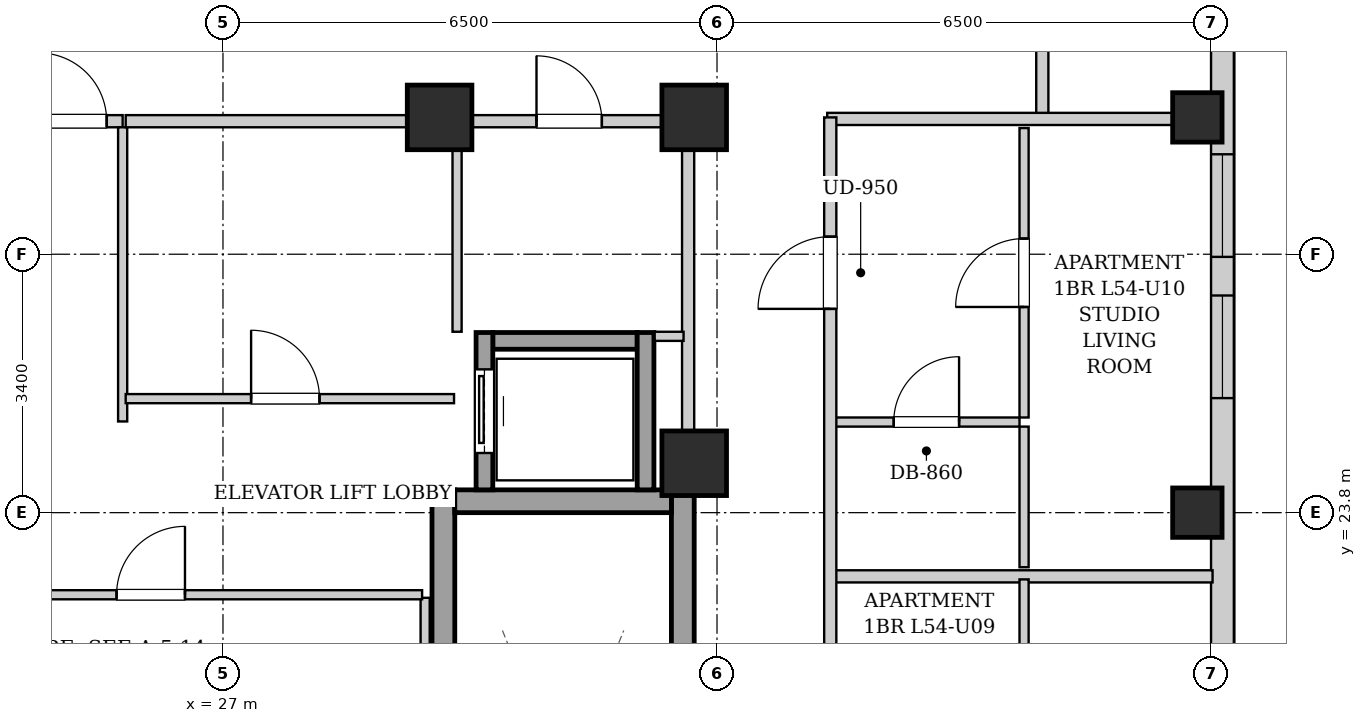
"""IFC4 building model, lengths in metres.
Left out: names, types, materials, properties, quantities, classifications, styles, units other than length and angle.
Written with IfcOpenShell. Run it as: python <this file> out.ifc"""

import sys

from ifc_helpers import new_model, si_unit, direction, frame, frame_2d, origin, origin_2d, place, context, subcontext, project, spatial, rectangle, extrude, element, fill, save


model = new_model("IFC4")
c1 = context("Model", 3, precision=1e-05, world=origin(), true_north=direction((0.0, 1.0)))
c2 = subcontext(c1, "Body", "Model", "MODEL_VIEW")
j1 = project(units=[si_unit("LENGTHUNIT", "METRE"), si_unit("PLANEANGLEUNIT", "RADIAN")], contexts=[c1])
p1 = place(None, origin())
s1 = spatial("IfcSite", under=j1, at=p1, CompositionType="ELEMENT")
p2 = place(p1, origin())
s2 = spatial("IfcBuilding", under=s1, at=p2, CompositionType="ELEMENT")
p3 = place(p2, frame((0.0, 0.0, 187.6)))
s3 = spatial("IfcBuildingStorey", under=s2, at=p3, CompositionType="ELEMENT", Elevation=187.6)
for number, where, z_axis, x_axis in (
    (1, (39.82, 23.8, 0.0), (0.0, 0.0, 1.0), (1.0, 0.0, 0.0)),
    (2, (39.82, 29.0, 0.0), (0.0, 0.0, 1.0), (1.0, 0.0, 0.0)),
):
    element("IfcColumn", number, at=place(p3, frame(where, z_axis=z_axis, x_axis=x_axis)), inside=s3, PredefinedType="COLUMN", context=c2, shape_type="SweptSolid", body=[
        extrude(rectangle(XDim=0.65, YDim=0.65, at=origin_2d()), origin(), (0.0, 0.0, 1.0), 3.3),
    ])
for number, where, z_axis, x_axis in (
    (3, (29.85, 29.0, 0.0), (0.0, 0.0, 1.0), (1.0, 0.0, 0.0)),
    (4, (33.2, 29.0, 0.0), (0.0, 0.0, 1.0), (1.0, 0.0, 0.0)),
    (5, (33.2, 24.45, 0.0), (0.0, 0.0, 1.0), (1.0, 0.0, 0.0)),
):
    element("IfcColumn", number, at=place(p3, frame(where, z_axis=z_axis, x_axis=x_axis)), inside=s3, PredefinedType="COLUMN", context=c2, shape_type="SweptSolid", body=[
        extrude(rectangle(XDim=0.85, YDim=0.85, at=origin_2d()), origin(), (0.0, 0.0, 1.0), 3.3),
    ])
p4 = place(p3, frame((40.15, 37.7, 0.0), z_axis=(0.0, 0.0, 1.0), x_axis=(0.0, -1.0, 0.0)))
e6 = element("IfcWall", 6, at=p4, inside=s3, PredefinedType="SOLIDWALL", context=c2, shape_type="SweptSolid", body=[
    extrude(rectangle(XDim=31.4, YDim=0.3, at=frame_2d((15.7, 0.0))), origin(), (0.0, 0.0, 1.0), 3.04),
])
p5 = place(p4, frame((1.504, 0.0, 0.55)))
e7 = element("IfcOpeningElement", 7, at=p5, cuts=e6, PredefinedType="OPENING", context=c2, shape_type="SweptSolid", body=[
    extrude(rectangle(XDim=1.35, YDim=1.2, at=frame_2d((0.675, 0.6))), frame((0.0, 0.16, 0.0), z_axis=(0.0, -1.0, 0.0), x_axis=(1.0, 0.0, 0.0)), (0.0, 0.0, 1.0), 0.32),
])
p6 = place(p4, frame((18.2, 0.0, 0.55)))
e8 = element("IfcOpeningElement", 8, at=p6, cuts=e6, PredefinedType="OPENING", context=c2, shape_type="SweptSolid", body=[
    extrude(rectangle(XDim=1.35, YDim=1.2, at=frame_2d((0.675, 0.6))), frame((0.0, 0.16, 0.0), z_axis=(0.0, -1.0, 0.0), x_axis=(1.0, 0.0, 0.0)), (0.0, 0.0, 1.0), 0.32),
])
p7 = place(p4, frame((19.81, 0.0, 0.55)))
e9 = element("IfcOpeningElement", 9, at=p7, cuts=e6, PredefinedType="OPENING", context=c2, shape_type="SweptSolid", body=[
    extrude(rectangle(XDim=1.35, YDim=1.2, at=frame_2d((0.675, 0.6))), frame((0.0, 0.16, 0.0), z_axis=(0.0, -1.0, 0.0), x_axis=(1.0, 0.0, 0.0)), (0.0, 0.0, 1.0), 0.32),
])
p8 = place(p4, frame((11.043, 0.0, 0.55)))
e10 = element("IfcOpeningElement", 10, at=p8, cuts=e6, PredefinedType="OPENING", context=c2, shape_type="SweptSolid", body=[
    extrude(rectangle(XDim=1.35, YDim=1.2, at=frame_2d((0.675, 0.6))), frame((0.0, 0.16, 0.0), z_axis=(0.0, -1.0, 0.0), x_axis=(1.0, 0.0, 0.0)), (0.0, 0.0, 1.0), 0.32),
])
p9 = place(p4, frame((9.185, 0.0, 0.55)))
e11 = element("IfcOpeningElement", 11, at=p9, cuts=e6, PredefinedType="OPENING", context=c2, shape_type="SweptSolid", body=[
    extrude(rectangle(XDim=1.35, YDim=1.2, at=frame_2d((0.675, 0.6))), frame((0.0, 0.16, 0.0), z_axis=(0.0, -1.0, 0.0), x_axis=(1.0, 0.0, 0.0)), (0.0, 0.0, 1.0), 0.32),
])
for number, where, z_axis, x_axis in (
    (12, (29.9, 15.1, 0.0), (0.0, 0.0, 1.0), (0.0, 1.0, 0.0)),
    (13, (33.05, 15.1, 0.0), (0.0, 0.0, 1.0), (0.0, 1.0, 0.0)),
):
    element("IfcWall", number, at=place(p3, frame(where, z_axis=z_axis, x_axis=x_axis)), inside=s3, PredefinedType="SHEAR", context=c2, shape_type="SweptSolid", body=[
        extrude(rectangle(XDim=9.0, YDim=0.3, at=frame_2d((4.5, 0.0))), origin(), (0.0, 0.0, 1.0), 3.04),
    ])
p10 = place(p3, frame((30.05, 23.95, 0.0), z_axis=(0.0, 0.0, 1.0), x_axis=(1.0, 0.0, 0.0)))
e14 = element("IfcWall", 14, at=p10, inside=s3, PredefinedType="SHEAR", context=c2, shape_type="SweptSolid", body=[
    extrude(rectangle(XDim=2.85, YDim=0.3, at=frame_2d((1.425, 0.0))), origin(), (0.0, 0.0, 1.0), 3.04),
])
p11 = place(p3, frame((30.55, 26.06, 0.0), z_axis=(0.0, 0.0, 1.0), x_axis=(1.0, 0.0, 0.0)))
e15 = element("IfcWall", 15, at=p11, inside=s3, PredefinedType="SHEAR", context=c2, shape_type="SweptSolid", body=[
    extrude(rectangle(XDim=1.9, YDim=0.22, at=frame_2d((0.95, 0.0))), origin(), (0.0, 0.0, 1.0), 3.04),
])
p12 = place(p3, frame((30.44, 24.1, 0.0), z_axis=(0.0, 0.0, 1.0), x_axis=(0.0, 1.0, 0.0)))
e16 = element("IfcWall", 16, at=p12, inside=s3, PredefinedType="SHEAR", context=c2, shape_type="SweptSolid", body=[
    extrude(rectangle(XDim=2.07, YDim=0.22, at=frame_2d((1.035, 0.0))), origin(), (0.0, 0.0, 1.0), 3.04),
])
p13 = place(p12, frame((0.485, 0.0, 0.0)))
e17 = element("IfcOpeningElement", 17, at=p13, cuts=e16, PredefinedType="OPENING", context=c2, shape_type="SweptSolid", body=[
    extrude(rectangle(XDim=1.1, YDim=2.15, at=frame_2d((0.55, 1.075))), frame((0.0, 0.12, 0.0), z_axis=(0.0, -1.0, 0.0), x_axis=(1.0, 0.0, 0.0)), (0.0, 0.0, 1.0), 0.24),
])
p14 = place(p3, frame((32.56, 24.1, 0.0), z_axis=(0.0, 0.0, 1.0), x_axis=(0.0, 1.0, 0.0)))
e18 = element("IfcWall", 18, at=p14, inside=s3, PredefinedType="SHEAR", context=c2, shape_type="SweptSolid", body=[
    extrude(rectangle(XDim=2.07, YDim=0.22, at=frame_2d((1.035, 0.0))), origin(), (0.0, 0.0, 1.0), 3.04),
])
p15 = place(p3, frame((33.12, 24.12, 0.0), z_axis=(0.0, 0.0, 1.0), x_axis=(0.0, 1.0, 0.0)))
e19 = element("IfcWall", 19, at=p15, inside=s3, PredefinedType="PARTITIONING", context=c2, shape_type="SweptSolid", body=[
    extrude(rectangle(XDim=4.76, YDim=0.16, at=frame_2d((2.38, 0.0))), origin(), (0.0, 0.0, 1.0), 2.375),
])
p16 = place(p3, frame((24.36, 28.95, 0.0), z_axis=(0.0, 0.0, 1.0), x_axis=(1.0, 0.0, 0.0)))
e20 = element("IfcWall", 20, at=p16, inside=s3, PredefinedType="PARTITIONING", context=c2, shape_type="SweptSolid", body=[
    extrude(rectangle(XDim=1.32, YDim=0.16, at=frame_2d((0.66, 0.0))), origin(), (0.0, 0.0, 1.0), 2.556),
])
p17 = place(p16, frame((0.21, 0.0, 0.0)))
e21 = element("IfcOpeningElement", 21, at=p17, cuts=e20, PredefinedType="OPENING", context=c2, shape_type="SweptSolid", body=[
    extrude(rectangle(XDim=0.9, YDim=2.05, at=frame_2d((0.45, 1.025))), frame((0.0, 0.09, 0.0), z_axis=(0.0, -1.0, 0.0), x_axis=(1.0, 0.0, 0.0)), (0.0, 0.0, 1.0), 0.18),
])
p18 = place(p3, frame((25.68, 25.0, 0.0), z_axis=(0.0, 0.0, 1.0), x_axis=(0.0, 1.0, 0.0)))
e22 = element("IfcWall", 22, at=p18, inside=s3, PredefinedType="PARTITIONING", context=c2, shape_type="SweptSolid", body=[
    extrude(rectangle(XDim=3.87, YDim=0.12, at=frame_2d((1.935, 0.0))), origin(), (0.0, 0.0, 1.0), 3.04),
])
p19 = place(p3, frame((30.08, 26.18, 0.0), z_axis=(0.0, 0.0, 1.0), x_axis=(0.0, 1.0, 0.0)))
e23 = element("IfcWall", 23, at=p19, inside=s3, PredefinedType="PARTITIONING", context=c2, shape_type="SweptSolid", body=[
    extrude(rectangle(XDim=2.68, YDim=0.12, at=frame_2d((1.34, 0.0))), origin(), (0.0, 0.0, 1.0), 3.04),
])
p20 = place(p3, frame((32.68, 26.12, 0.0), z_axis=(0.0, 0.0, 1.0), x_axis=(1.0, 0.0, 0.0)))
e24 = element("IfcWall", 24, at=p20, inside=s3, PredefinedType="PARTITIONING", context=c2, shape_type="SweptSolid", body=[
    extrude(rectangle(XDim=0.38, YDim=0.12, at=frame_2d((0.19, 0.0))), origin(), (0.0, 0.0, 1.0), 3.04),
])
p21 = place(p3, frame((30.08, 28.95, 0.0), z_axis=(0.0, 0.0, 1.0), x_axis=(1.0, 0.0, 0.0)))
e25 = element("IfcWall", 25, at=p21, inside=s3, PredefinedType="PARTITIONING", context=c2, shape_type="SweptSolid", body=[
    extrude(rectangle(XDim=2.96, YDim=0.16, at=frame_2d((1.48, 0.0))), origin(), (0.0, 0.0, 1.0), 3.04),
])
p22 = place(p21, frame((1.045, 0.0, 0.0)))
e26 = element("IfcOpeningElement", 26, at=p22, cuts=e25, PredefinedType="OPENING", context=c2, shape_type="SweptSolid", body=[
    extrude(rectangle(XDim=0.86, YDim=2.05, at=frame_2d((0.43, 1.025))), frame((0.0, 0.09, 0.0), z_axis=(0.0, -1.0, 0.0), x_axis=(1.0, 0.0, 0.0)), (0.0, 0.0, 1.0), 0.18),
])
p23 = place(p3, frame((25.72, 28.95, 0.0), z_axis=(0.0, 0.0, 1.0), x_axis=(1.0, 0.0, 0.0)))
e27 = element("IfcWall", 27, at=p23, inside=s3, PredefinedType="PARTITIONING", context=c2, shape_type="SweptSolid", body=[
    extrude(rectangle(XDim=4.32, YDim=0.16, at=frame_2d((2.16, 0.0))), origin(), (0.0, 0.0, 1.0), 2.556),
])
p24 = place(p3, frame((25.72, 25.3, 0.0), z_axis=(0.0, 0.0, 1.0), x_axis=(1.0, 0.0, 0.0)))
e28 = element("IfcWall", 28, at=p24, inside=s3, PredefinedType="PARTITIONING", context=c2, shape_type="SweptSolid", body=[
    extrude(rectangle(XDim=4.32, YDim=0.12, at=frame_2d((2.16, 0.0))), origin(), (0.0, 0.0, 1.0), 3.04),
])
p25 = place(p24, frame((1.65, 0.0, 0.0)))
e29 = element("IfcOpeningElement", 29, at=p25, cuts=e28, PredefinedType="OPENING", context=c2, shape_type="SweptSolid", body=[
    extrude(rectangle(XDim=0.9, YDim=2.05, at=frame_2d((0.45, 1.025))), frame((0.0, 0.07, 0.0), z_axis=(0.0, -1.0, 0.0), x_axis=(1.0, 0.0, 0.0)), (0.0, 0.0, 1.0), 0.14),
])
p26 = place(p3, frame((29.66, 20.62, 0.0), z_axis=(0.0, 0.0, 1.0), x_axis=(0.0, 1.0, 0.0)))
e30 = element("IfcWall", 30, at=p26, inside=s3, PredefinedType="PARTITIONING", context=c2, shape_type="SweptSolid", body=[
    extrude(rectangle(XDim=2.06, YDim=0.12, at=frame_2d((1.03, 0.0))), origin(), (0.0, 0.0, 1.0), 3.04),
])
p27 = place(p3, frame((22.35, 22.72, 0.0), z_axis=(0.0, 0.0, 1.0), x_axis=(1.0, 0.0, 0.0)))
e31 = element("IfcWall", 31, at=p27, inside=s3, PredefinedType="PARTITIONING", context=c2, shape_type="SweptSolid", body=[
    extrude(rectangle(XDim=7.27, YDim=0.12, at=frame_2d((3.635, 0.0))), origin(), (0.0, 0.0, 1.0), 3.04),
])
p28 = place(p27, frame((3.25, 0.0, 0.0)))
e32 = element("IfcOpeningElement", 32, at=p28, cuts=e31, PredefinedType="OPENING", context=c2, shape_type="SweptSolid", body=[
    extrude(rectangle(XDim=0.9, YDim=2.05, at=frame_2d((0.45, 1.025))), frame((0.0, 0.07, 0.0), z_axis=(0.0, -1.0, 0.0), x_axis=(1.0, 0.0, 0.0)), (0.0, 0.0, 1.0), 0.14),
])
p29 = place(p3, frame((37.78, 28.98, 0.0), z_axis=(0.0, 0.0, 1.0), x_axis=(0.0, 1.0, 0.0)))
e33 = element("IfcWall", 33, at=p29, inside=s3, PredefinedType="PARTITIONING", context=c2, shape_type="SweptSolid", body=[
    extrude(rectangle(XDim=1.58, YDim=0.16, at=frame_2d((0.79, 0.0))), origin(), (0.0, 0.0, 1.0), 3.04),
])
p30 = place(p3, frame((34.95, 28.98, 0.0), z_axis=(0.0, 0.0, 1.0), x_axis=(1.0, 0.0, 0.0)))
e34 = element("IfcWall", 34, at=p30, inside=s3, PredefinedType="PARTITIONING", context=c2, shape_type="SweptSolid", body=[
    extrude(rectangle(XDim=5.07, YDim=0.16, at=frame_2d((2.535, 0.0))), origin(), (0.0, 0.0, 1.0), 2.556),
])
p31 = place(p3, frame((35.03, 22.962, 0.0), z_axis=(0.0, 0.0, 1.0), x_axis=(1.0, 0.0, 0.0)))
e35 = element("IfcWall", 35, at=p31, inside=s3, PredefinedType="PARTITIONING", context=c2, shape_type="SweptSolid", body=[
    extrude(rectangle(XDim=4.99, YDim=0.16, at=frame_2d((2.495, 0.0))), origin(), (0.0, 0.0, 1.0), 3.04),
])
p32 = place(p3, frame((37.54, 17.489, 0.0), z_axis=(0.0, 0.0, 1.0), x_axis=(0.0, 1.0, 0.0)))
e36 = element("IfcWall", 36, at=p32, inside=s3, PredefinedType="PARTITIONING", context=c2, shape_type="SweptSolid", body=[
    extrude(rectangle(XDim=5.433, YDim=0.12, at=frame_2d((2.717, 0.0))), origin(), (0.0, 0.0, 1.0), 3.04),
])
p33 = place(p32, frame((2.266, 0.0, 0.0)))
e37 = element("IfcOpeningElement", 37, at=p33, cuts=e36, PredefinedType="OPENING", context=c2, shape_type="SweptSolid", body=[
    extrude(rectangle(XDim=0.9, YDim=2.05, at=frame_2d((0.45, 1.025))), frame((0.0, 0.07, 0.0), z_axis=(0.0, -1.0, 0.0), x_axis=(1.0, 0.0, 0.0)), (0.0, 0.0, 1.0), 0.14),
])
p34 = place(p3, frame((35.03, 24.992, 0.0), z_axis=(0.0, 0.0, 1.0), x_axis=(1.0, 0.0, 0.0)))
e38 = element("IfcWall", 38, at=p34, inside=s3, PredefinedType="PARTITIONING", context=c2, shape_type="SweptSolid", body=[
    extrude(rectangle(XDim=2.45, YDim=0.12, at=frame_2d((1.225, 0.0))), origin(), (0.0, 0.0, 1.0), 3.04),
])
p35 = place(p34, frame((0.795, 0.0, 0.0)))
e39 = element("IfcOpeningElement", 39, at=p35, cuts=e38, PredefinedType="OPENING", context=c2, shape_type="SweptSolid", body=[
    extrude(rectangle(XDim=0.86, YDim=2.05, at=frame_2d((0.43, 1.025))), frame((0.0, 0.07, 0.0), z_axis=(0.0, -1.0, 0.0), x_axis=(1.0, 0.0, 0.0)), (0.0, 0.0, 1.0), 0.14),
])
p36 = place(p3, frame((37.54, 23.082, 0.0), z_axis=(0.0, 0.0, 1.0), x_axis=(0.0, 1.0, 0.0)))
e40 = element("IfcWall", 40, at=p36, inside=s3, PredefinedType="PARTITIONING", context=c2, shape_type="SweptSolid", body=[
    extrude(rectangle(XDim=1.85, YDim=0.12, at=frame_2d((0.925, 0.0))), origin(), (0.0, 0.0, 1.0), 3.04),
])
p37 = place(p3, frame((37.54, 25.052, 0.0), z_axis=(0.0, 0.0, 1.0), x_axis=(0.0, 1.0, 0.0)))
e41 = element("IfcWall", 41, at=p37, inside=s3, PredefinedType="PARTITIONING", context=c2, shape_type="SweptSolid", body=[
    extrude(rectangle(XDim=3.808, YDim=0.12, at=frame_2d((1.904, 0.0))), origin(), (0.0, 0.0, 1.0), 3.04),
])
p38 = place(p37, frame((1.454, 0.0, 0.0)))
e42 = element("IfcOpeningElement", 42, at=p38, cuts=e41, PredefinedType="OPENING", context=c2, shape_type="SweptSolid", body=[
    extrude(rectangle(XDim=0.9, YDim=2.05, at=frame_2d((0.45, 1.025))), frame((0.0, 0.07, 0.0), z_axis=(0.0, -1.0, 0.0), x_axis=(1.0, 0.0, 0.0)), (0.0, 0.0, 1.0), 0.14),
])
p39 = place(p3, frame((34.99, 15.07, 0.0), z_axis=(0.0, 0.0, 1.0), x_axis=(0.0, 1.0, 0.0)))
e43 = element("IfcWall", 43, at=p39, inside=s3, PredefinedType="PARTITIONING", context=c2, shape_type="SweptSolid", body=[
    extrude(rectangle(XDim=13.93, YDim=0.16, at=frame_2d((6.965, 0.0))), origin(), (0.0, 0.0, 1.0), 3.04),
])
p40 = place(p39, frame((4.661, 0.0, 0.0)))
e44 = element("IfcOpeningElement", 44, at=p40, cuts=e43, PredefinedType="OPENING", context=c2, shape_type="SweptSolid", body=[
    extrude(rectangle(XDim=0.95, YDim=2.1, at=frame_2d((0.475, 1.05))), frame((0.0, 0.09, 0.0), z_axis=(0.0, -1.0, 0.0), x_axis=(1.0, 0.0, 0.0)), (0.0, 0.0, 1.0), 0.18),
])
p41 = place(p39, frame((11.411, 0.0, 0.0)))
e45 = element("IfcOpeningElement", 45, at=p41, cuts=e43, PredefinedType="OPENING", context=c2, shape_type="SweptSolid", body=[
    extrude(rectangle(XDim=0.95, YDim=2.1, at=frame_2d((0.475, 1.05))), frame((0.0, 0.09, 0.0), z_axis=(0.0, -1.0, 0.0), x_axis=(1.0, 0.0, 0.0)), (0.0, 0.0, 1.0), 0.18),
])
p42 = place(p13, origin())
e46 = element("IfcDoor", 46, at=p42, inside=s3, OperationType="SLIDING_TO_LEFT", PredefinedType="DOOR", context=c2, shape_type="SweptSolid", body=[
    extrude(rectangle(XDim=1.1, YDim=2.15, at=frame_2d((0.55, 1.075))), frame((0.0, 0.025, 0.0), z_axis=(0.0, -1.0, 0.0), x_axis=(1.0, 0.0, 0.0)), (0.0, 0.0, 1.0), 0.05),
])
fill(e17, e46)
p43 = place(p17, origin())
e47 = element("IfcDoor", 47, at=p43, inside=s3, OperationType="SINGLE_SWING_LEFT", PredefinedType="DOOR", context=c2, shape_type="SweptSolid", body=[
    extrude(rectangle(XDim=0.9, YDim=2.05, at=frame_2d((0.45, 1.025))), frame((0.0, 0.025, 0.0), z_axis=(0.0, -1.0, 0.0), x_axis=(1.0, 0.0, 0.0)), (0.0, 0.0, 1.0), 0.05),
])
fill(e21, e47)
p44 = place(p22, origin())
e48 = element("IfcDoor", 48, at=p44, inside=s3, OperationType="SINGLE_SWING_LEFT", PredefinedType="DOOR", context=c2, shape_type="SweptSolid", body=[
    extrude(rectangle(XDim=0.86, YDim=2.05, at=frame_2d((0.43, 1.025))), frame((0.0, 0.025, 0.0), z_axis=(0.0, -1.0, 0.0), x_axis=(1.0, 0.0, 0.0)), (0.0, 0.0, 1.0), 0.05),
])
fill(e26, e48)
p45 = place(p25, origin())
e49 = element("IfcDoor", 49, at=p45, inside=s3, OperationType="SINGLE_SWING_LEFT", PredefinedType="DOOR", context=c2, shape_type="SweptSolid", body=[
    extrude(rectangle(XDim=0.9, YDim=2.05, at=frame_2d((0.45, 1.025))), frame((0.0, 0.025, 0.0), z_axis=(0.0, -1.0, 0.0), x_axis=(1.0, 0.0, 0.0)), (0.0, 0.0, 1.0), 0.05),
])
fill(e29, e49)
p46 = place(p28, origin())
e50 = element("IfcDoor", 50, at=p46, inside=s3, OperationType="SINGLE_SWING_RIGHT", PredefinedType="DOOR", context=c2, shape_type="SweptSolid", body=[
    extrude(rectangle(XDim=0.9, YDim=2.05, at=frame_2d((0.45, 1.025))), frame((0.0, 0.025, 0.0), z_axis=(0.0, -1.0, 0.0), x_axis=(1.0, 0.0, 0.0)), (0.0, 0.0, 1.0), 0.05),
])
fill(e32, e50)
p47 = place(p35, origin())
e51 = element("IfcDoor", 51, at=p47, inside=s3, OperationType="SINGLE_SWING_RIGHT", PredefinedType="DOOR", context=c2, shape_type="SweptSolid", body=[
    extrude(rectangle(XDim=0.86, YDim=2.05, at=frame_2d((0.43, 1.025))), frame((0.0, 0.025, 0.0), z_axis=(0.0, -1.0, 0.0), x_axis=(1.0, 0.0, 0.0)), (0.0, 0.0, 1.0), 0.05),
])
fill(e39, e51)
p48 = place(p38, origin())
e52 = element("IfcDoor", 52, at=p48, inside=s3, OperationType="SINGLE_SWING_LEFT", PredefinedType="DOOR", context=c2, shape_type="SweptSolid", body=[
    extrude(rectangle(XDim=0.9, YDim=2.05, at=frame_2d((0.45, 1.025))), frame((0.0, 0.025, 0.0), z_axis=(0.0, -1.0, 0.0), x_axis=(1.0, 0.0, 0.0)), (0.0, 0.0, 1.0), 0.05),
])
fill(e42, e52)
p49 = place(p41, origin())
e53 = element("IfcDoor", 53, at=p49, inside=s3, OperationType="SINGLE_SWING_LEFT", PredefinedType="DOOR", context=c2, shape_type="SweptSolid", body=[
    extrude(rectangle(XDim=0.95, YDim=2.1, at=frame_2d((0.475, 1.05))), frame((0.0, 0.025, 0.0), z_axis=(0.0, -1.0, 0.0), x_axis=(1.0, 0.0, 0.0)), (0.0, 0.0, 1.0), 0.05),
])
fill(e45, e53)
p50 = place(p8, origin())
e54 = element("IfcWindow", 54, at=p50, inside=s3, PartitioningType="SINGLE_PANEL", PredefinedType="WINDOW", context=c2, shape_type="SweptSolid", body=[
    extrude(rectangle(XDim=1.35, YDim=1.2, at=frame_2d((0.675, 0.6))), frame((0.0, 0.03, 0.0), z_axis=(0.0, -1.0, 0.0), x_axis=(1.0, 0.0, 0.0)), (0.0, 0.0, 1.0), 0.06),
])
fill(e10, e54)
p51 = place(p9, origin())
e55 = element("IfcWindow", 55, at=p51, inside=s3, PartitioningType="SINGLE_PANEL", PredefinedType="WINDOW", context=c2, shape_type="SweptSolid", body=[
    extrude(rectangle(XDim=1.35, YDim=1.2, at=frame_2d((0.675, 0.6))), frame((0.0, 0.03, 0.0), z_axis=(0.0, -1.0, 0.0), x_axis=(1.0, 0.0, 0.0)), (0.0, 0.0, 1.0), 0.06),
])
fill(e11, e55)
save(model, sys.argv[1])
